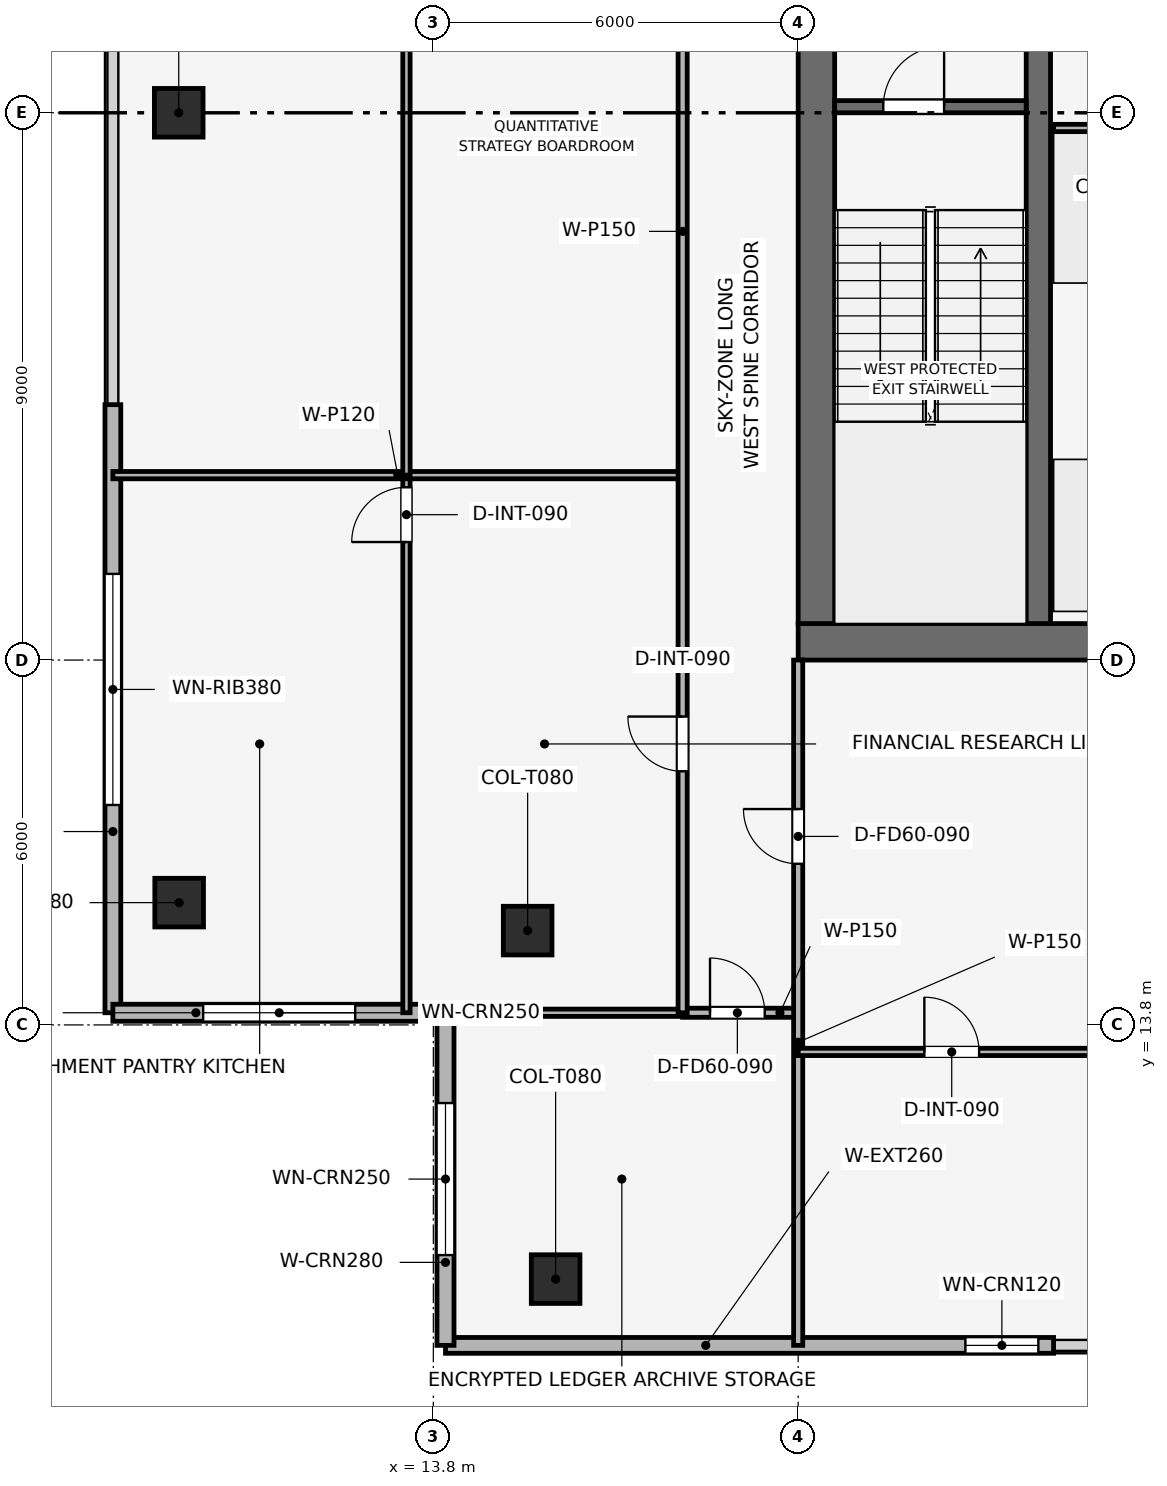
"""IFC4 building model, lengths in metres.
Left out: names, types, materials, properties, quantities, classifications, styles, units other than length and angle.
Written with IfcOpenShell. Run it as: python <this file> out.ifc"""

import sys

from ifc_helpers import new_model, si_unit, direction, frame, frame_2d, origin, origin_2d, place, context, subcontext, project, spatial, rectangle, extrude, element, fill, save


model = new_model("IFC4")
c1 = context("Model", 3, precision=1e-05, world=origin(), true_north=direction((0.0, 1.0)))
c2 = subcontext(c1, "Body", "Model", "MODEL_VIEW")
j1 = project(units=[si_unit("LENGTHUNIT", "METRE"), si_unit("PLANEANGLEUNIT", "RADIAN")], contexts=[c1])
p1 = place(None, origin())
s1 = spatial("IfcSite", under=j1, at=p1, CompositionType="ELEMENT")
p2 = place(p1, origin())
s2 = spatial("IfcBuilding", under=s1, at=p2, CompositionType="ELEMENT")
p3 = place(p2, frame((0.0, 0.0, 364.5)))
s3 = spatial("IfcBuildingStorey", under=s2, at=p3, CompositionType="ELEMENT", Elevation=364.5)
p4 = place(p3, frame((19.8, 20.1, 0.0), z_axis=(0.0, 0.0, 1.0), x_axis=(1.0, 0.0, 0.0)))
e1 = element("IfcWall", 1, at=p4, inside=s3, PredefinedType="SHEAR", context=c2, shape_type="SweptSolid", body=[
    extrude(rectangle(XDim=18.0, YDim=0.6, at=frame_2d((9.0, 0.0))), origin(), (0.0, 0.0, 1.0), 4.5),
])
p5 = place(p3, frame((20.1, 20.4, 0.0), z_axis=(0.0, 0.0, 1.0), x_axis=(0.0, 1.0, 0.0)))
e2 = element("IfcWall", 2, at=p5, inside=s3, PredefinedType="SHEAR", context=c2, shape_type="SweptSolid", body=[
    extrude(rectangle(XDim=16.8, YDim=0.6, at=frame_2d((8.4, 0.0))), origin(), (0.0, 0.0, 1.0), 4.5),
])
p6 = place(p5, frame((10.4, 0.0, 0.0)))
e3 = element("IfcOpeningElement", 3, at=p6, cuts=e2, PredefinedType="OPENING", context=c2, shape_type="SweptSolid", body=[
    extrude(rectangle(XDim=1.1, YDim=2.15, at=frame_2d((0.55, 1.075))), frame((0.0, 0.31, 0.0), z_axis=(0.0, -1.0, 0.0), x_axis=(1.0, 0.0, 0.0)), (0.0, 0.0, 1.0), 0.62),
])
p7 = place(p3, frame((23.75, 20.4, 0.0), z_axis=(0.0, 0.0, 1.0), x_axis=(0.0, 1.0, 0.0)))
e4 = element("IfcWall", 4, at=p7, inside=s3, PredefinedType="SHEAR", context=c2, shape_type="SweptSolid", body=[
    extrude(rectangle(XDim=16.8, YDim=0.4, at=frame_2d((8.4, 0.0))), origin(), (0.0, 0.0, 1.0), 4.5),
])
p8 = place(p3, frame((15.811, 9.62, 0.051), z_axis=(0.202047238794, 0.363749581663, 0.909320160964), x_axis=(-0.874193862425, 0.485577069989, 0.0)))
e5 = element("IfcColumn", 5, at=p8, inside=s3, PredefinedType="COLUMN", context=c2, shape_type="SweptSolid", body=[
    extrude(rectangle(XDim=0.8, YDim=0.8, at=origin_2d()), origin(), (0.0, 0.0, 1.0), 4.539),
])
p9 = place(p3, frame((9.613, 28.8, 0.033), z_axis=(0.371428235787, 0.0, 0.928461666231), x_axis=(0.0, 1.0, 0.0)))
e6 = element("IfcColumn", 6, at=p9, inside=s3, PredefinedType="COLUMN", context=c2, shape_type="SweptSolid", body=[
    extrude(rectangle(XDim=0.8, YDim=0.8, at=origin_2d()), origin(), (0.0, 0.0, 1.0), 4.483),
])
p10 = place(p3, frame((9.62, 15.811, 0.051), z_axis=(0.363749581663, 0.202047238794, 0.909320160964), x_axis=(-0.485577069989, 0.874193862425, 0.0)))
e7 = element("IfcColumn", 7, at=p10, inside=s3, PredefinedType="COLUMN", context=c2, shape_type="SweptSolid", body=[
    extrude(rectangle(XDim=0.8, YDim=0.8, at=origin_2d()), origin(), (0.0, 0.0, 1.0), 4.539),
])
p11 = place(p3, frame((15.351, 15.351, 0.005), z_axis=(0.21206137456, 0.21206137456, 0.953970621581), x_axis=(-0.707106781187, 0.707106781187, 0.0)))
e8 = element("IfcColumn", 8, at=p11, inside=s3, PredefinedType="COLUMN", context=c2, shape_type="SweptSolid", body=[
    extrude(rectangle(XDim=0.8, YDim=0.8, at=origin_2d()), origin(), (0.0, 0.0, 1.0), 4.395),
])
p12 = place(p3, frame((24.0, 8.53, 0.0), z_axis=(0.0, 0.0, 1.0), x_axis=(-1.0, 0.0, 0.0)))
e9 = element("IfcWall", 9, at=p12, inside=s3, PredefinedType="SOLIDWALL", context=c2, shape_type="SweptSolid", body=[
    extrude(rectangle(XDim=10.0, YDim=0.26, at=frame_2d((5.0, 0.0))), origin(), (0.0, 0.0, 1.0), 4.2),
])
p13 = place(p12, frame((0.25, 0.0, 0.9)))
e10 = element("IfcOpeningElement", 10, at=p13, cuts=e9, PredefinedType="OPENING", context=c2, shape_type="SweptSolid", body=[
    extrude(rectangle(XDim=1.2, YDim=2.1, at=frame_2d((0.6, 1.05))), frame((0.0, 0.14, 0.0), z_axis=(0.0, -1.0, 0.0), x_axis=(1.0, 0.0, 0.0)), (0.0, 0.0, 1.0), 0.28),
])
p14 = place(p3, frame((8.53, 14.0, 0.0), z_axis=(0.0, 0.0, 1.0), x_axis=(0.0, 1.0, 0.0)))
e11 = element("IfcWall", 11, at=p14, inside=s3, PredefinedType="SOLIDWALL", context=c2, shape_type="SweptSolid", body=[
    extrude(rectangle(XDim=10.0, YDim=0.26, at=frame_2d((5.0, 0.0))), origin(), (0.0, 0.0, 1.0), 4.2),
])
p15 = place(p14, frame((3.417, 0.0, 0.9)))
e12 = element("IfcOpeningElement", 12, at=p15, cuts=e11, PredefinedType="OPENING", context=c2, shape_type="SweptSolid", body=[
    extrude(rectangle(XDim=3.8, YDim=1.9, at=frame_2d((1.9, 0.95))), frame((0.0, 0.14, 0.0), z_axis=(0.0, -1.0, 0.0), x_axis=(1.0, 0.0, 0.0)), (0.0, 0.0, 1.0), 0.28),
])
p16 = place(p3, frame((14.0, 8.53, 0.0), z_axis=(0.0, 0.0, 1.0), x_axis=(0.0, 1.0, 0.0)))
e13 = element("IfcWall", 13, at=p16, inside=s3, PredefinedType="SOLIDWALL", context=c2, shape_type="SweptSolid", body=[
    extrude(rectangle(XDim=5.47, YDim=0.28, at=frame_2d((2.735, 0.0))), origin(), (0.0, 0.0, 1.0), 4.2),
])
p17 = place(p16, frame((1.485, 0.0, 0.9)))
e14 = element("IfcOpeningElement", 14, at=p17, cuts=e13, PredefinedType="OPENING", context=c2, shape_type="SweptSolid", body=[
    extrude(rectangle(XDim=2.5, YDim=1.9, at=frame_2d((1.25, 0.95))), frame((0.0, 0.15, 0.0), z_axis=(0.0, -1.0, 0.0), x_axis=(1.0, 0.0, 0.0)), (0.0, 0.0, 1.0), 0.3),
])
p18 = place(p3, frame((14.0, 14.0, 0.0), z_axis=(0.0, 0.0, 1.0), x_axis=(-1.0, 0.0, 0.0)))
e15 = element("IfcWall", 15, at=p18, inside=s3, PredefinedType="SOLIDWALL", context=c2, shape_type="SweptSolid", body=[
    extrude(rectangle(XDim=5.47, YDim=0.28, at=frame_2d((2.735, 0.0))), origin(), (0.0, 0.0, 1.0), 4.2),
])
p19 = place(p18, frame((1.485, 0.0, 0.9)))
e16 = element("IfcOpeningElement", 16, at=p19, cuts=e15, PredefinedType="OPENING", context=c2, shape_type="SweptSolid", body=[
    extrude(rectangle(XDim=2.5, YDim=1.9, at=frame_2d((1.25, 0.95))), frame((0.0, 0.15, 0.0), z_axis=(0.0, -1.0, 0.0), x_axis=(1.0, 0.0, 0.0)), (0.0, 0.0, 1.0), 0.3),
])
p20 = place(p3, frame((20.4, 28.9, 0.0), z_axis=(0.0, 0.0, 1.0), x_axis=(1.0, 0.0, 0.0)))
e17 = element("IfcWall", 17, at=p20, inside=s3, PredefinedType="SHEAR", context=c2, shape_type="SweptSolid", body=[
    extrude(rectangle(XDim=3.15, YDim=0.2, at=frame_2d((1.575, 0.0))), origin(), (0.0, 0.0, 1.0), 4.2),
])
p21 = place(p20, frame((0.8, 0.0, 0.0)))
e18 = element("IfcOpeningElement", 18, at=p21, cuts=e17, PredefinedType="OPENING", context=c2, shape_type="SweptSolid", body=[
    extrude(rectangle(XDim=1.0, YDim=2.1, at=frame_2d((0.5, 1.05))), frame((0.0, 0.11, 0.0), z_axis=(0.0, -1.0, 0.0), x_axis=(1.0, 0.0, 0.0)), (0.0, 0.0, 1.0), 0.22),
])
p22 = place(p3, frame((24.0, 28.55, 0.0), z_axis=(0.0, 0.0, 1.0), x_axis=(1.0, 0.0, 0.0)))
e19 = element("IfcWall", 19, at=p22, inside=s3, PredefinedType="PARTITIONING", context=c2, shape_type="SweptSolid", body=[
    extrude(rectangle(XDim=4.05, YDim=0.12, at=frame_2d((2.025, 0.0))), origin(), (0.0, 0.0, 1.0), 4.2),
])
p23 = place(p22, frame((1.575, 0.0, 0.0)))
e20 = element("IfcOpeningElement", 20, at=p23, cuts=e19, PredefinedType="OPENING", context=c2, shape_type="SweptSolid", body=[
    extrude(rectangle(XDim=0.9, YDim=2.1, at=frame_2d((0.45, 1.05))), frame((0.0, 0.07, 0.0), z_axis=(0.0, -1.0, 0.0), x_axis=(1.0, 0.0, 0.0)), (0.0, 0.0, 1.0), 0.14),
])
p24 = place(p3, frame((13.358, 14.0, 0.0), z_axis=(0.0, 0.0, 1.0), x_axis=(0.0, 1.0, 0.0)))
e21 = element("IfcWall", 21, at=p24, inside=s3, PredefinedType="PARTITIONING", context=c2, shape_type="SweptSolid", body=[
    extrude(rectangle(XDim=8.841, YDim=0.12, at=frame_2d((4.42, 0.0))), origin(), (0.0, 0.0, 1.0), 3.785),
])
p25 = place(p24, frame((7.741, 0.0, 0.0)))
e22 = element("IfcOpeningElement", 22, at=p25, cuts=e21, PredefinedType="OPENING", context=c2, shape_type="SweptSolid", body=[
    extrude(rectangle(XDim=0.9, YDim=2.1, at=frame_2d((0.45, 1.05))), frame((0.0, 0.07, 0.0), z_axis=(0.0, -1.0, 0.0), x_axis=(1.0, 0.0, 0.0)), (0.0, 0.0, 1.0), 0.14),
])
p26 = place(p3, frame((8.53, 22.841, 0.0), z_axis=(0.0, 0.0, 1.0), x_axis=(1.0, 0.0, 0.0)))
e23 = element("IfcWall", 23, at=p26, inside=s3, PredefinedType="PARTITIONING", context=c2, shape_type="SweptSolid", body=[
    extrude(rectangle(XDim=9.37, YDim=0.12, at=frame_2d((4.685, 0.0))), origin(), (0.0, 0.0, 1.0), 3.825),
])
p27 = place(p3, frame((13.358, 22.841, 0.0), z_axis=(0.0, 0.0, 1.0), x_axis=(0.0, 1.0, 0.0)))
e24 = element("IfcWall", 24, at=p27, inside=s3, PredefinedType="PARTITIONING", context=c2, shape_type="SweptSolid", body=[
    extrude(rectangle(XDim=16.859, YDim=0.12, at=frame_2d((8.429, 0.0))), origin(), (0.0, 0.0, 1.0), 3.285),
])
p28 = place(p27, frame((11.869, 0.0, 0.0)))
e25 = element("IfcOpeningElement", 25, at=p28, cuts=e24, PredefinedType="OPENING", context=c2, shape_type="SweptSolid", body=[
    extrude(rectangle(XDim=0.9, YDim=2.1, at=frame_2d((0.45, 1.05))), frame((0.0, 0.07, 0.0), z_axis=(0.0, -1.0, 0.0), x_axis=(1.0, 0.0, 0.0)), (0.0, 0.0, 1.0), 0.14),
])
p29 = place(p3, frame((14.0, 14.0, 0.0), z_axis=(0.0, 0.0, 1.0), x_axis=(1.0, 0.0, 0.0)))
e26 = element("IfcWall", 26, at=p29, inside=s3, PredefinedType="PARTITIONING", context=c2, shape_type="SweptSolid", body=[
    extrude(rectangle(XDim=3.9, YDim=0.12, at=frame_2d((1.95, 0.0))), origin(), (0.0, 0.0, 1.0), 3.885),
])
p30 = place(p3, frame((17.9, 14.0, 0.0), z_axis=(0.0, 0.0, 1.0), x_axis=(1.0, 0.0, 0.0)))
e27 = element("IfcWall", 27, at=p30, inside=s3, PredefinedType="PARTITIONING", context=c2, shape_type="SweptSolid", body=[
    extrude(rectangle(XDim=1.9, YDim=0.15, at=frame_2d((0.95, 0.0))), origin(), (0.0, 0.0, 1.0), 4.2),
])
p31 = place(p30, frame((0.45, 0.0, 0.0)))
e28 = element("IfcOpeningElement", 28, at=p31, cuts=e27, PredefinedType="OPENING", context=c2, shape_type="SweptSolid", body=[
    extrude(rectangle(XDim=0.9, YDim=2.1, at=frame_2d((0.45, 1.05))), frame((0.0, 0.085, 0.0), z_axis=(0.0, -1.0, 0.0), x_axis=(1.0, 0.0, 0.0)), (0.0, 0.0, 1.0), 0.17),
])
p32 = place(p3, frame((19.8, 8.53, 0.0), z_axis=(0.0, 0.0, 1.0), x_axis=(0.0, 1.0, 0.0)))
e29 = element("IfcWall", 29, at=p32, inside=s3, PredefinedType="PARTITIONING", context=c2, shape_type="SweptSolid", body=[
    extrude(rectangle(XDim=11.27, YDim=0.15, at=frame_2d((5.635, 0.0))), origin(), (0.0, 0.0, 1.0), 3.785),
])
p33 = place(p32, frame((7.92, 0.0, 0.0)))
e30 = element("IfcOpeningElement", 30, at=p33, cuts=e29, PredefinedType="OPENING", context=c2, shape_type="SweptSolid", body=[
    extrude(rectangle(XDim=0.9, YDim=2.1, at=frame_2d((0.45, 1.05))), frame((0.0, 0.085, 0.0), z_axis=(0.0, -1.0, 0.0), x_axis=(1.0, 0.0, 0.0)), (0.0, 0.0, 1.0), 0.17),
])
p34 = place(p3, frame((19.8, 13.356, 0.0), z_axis=(0.0, 0.0, 1.0), x_axis=(1.0, 0.0, 0.0)))
e31 = element("IfcWall", 31, at=p34, inside=s3, PredefinedType="PARTITIONING", context=c2, shape_type="SweptSolid", body=[
    extrude(rectangle(XDim=23.8, YDim=0.12, at=frame_2d((11.9, 0.0))), origin(), (0.0, 0.0, 1.0), 3.285),
])
p35 = place(p34, frame((2.075, 0.0, 0.0)))
e32 = element("IfcOpeningElement", 32, at=p35, cuts=e31, PredefinedType="OPENING", context=c2, shape_type="SweptSolid", body=[
    extrude(rectangle(XDim=0.9, YDim=2.1, at=frame_2d((0.45, 1.05))), frame((0.0, 0.07, 0.0), z_axis=(0.0, -1.0, 0.0), x_axis=(1.0, 0.0, 0.0)), (0.0, 0.0, 1.0), 0.14),
])
p36 = place(p3, frame((17.9, 14.0, 0.0), z_axis=(0.0, 0.0, 1.0), x_axis=(0.0, 1.0, 0.0)))
e33 = element("IfcWall", 33, at=p36, inside=s3, PredefinedType="PARTITIONING", context=c2, shape_type="SweptSolid", body=[
    extrude(rectangle(XDim=25.7, YDim=0.15, at=frame_2d((12.85, 0.0))), origin(), (0.0, 0.0, 1.0), 3.285),
])
p37 = place(p36, frame((3.971, 0.0, 0.0)))
e34 = element("IfcOpeningElement", 34, at=p37, cuts=e33, PredefinedType="OPENING", context=c2, shape_type="SweptSolid", body=[
    extrude(rectangle(XDim=0.9, YDim=2.1, at=frame_2d((0.45, 1.05))), frame((0.0, 0.085, 0.0), z_axis=(0.0, -1.0, 0.0), x_axis=(1.0, 0.0, 0.0)), (0.0, 0.0, 1.0), 0.17),
])
p38 = place(p36, frame((16.821, 0.0, 0.0)))
e35 = element("IfcOpeningElement", 35, at=p38, cuts=e33, PredefinedType="OPENING", context=c2, shape_type="SweptSolid", body=[
    extrude(rectangle(XDim=0.9, YDim=2.1, at=frame_2d((0.45, 1.05))), frame((0.0, 0.085, 0.0), z_axis=(0.0, -1.0, 0.0), x_axis=(1.0, 0.0, 0.0)), (0.0, 0.0, 1.0), 0.17),
])
p39 = place(p13, origin())
e36 = element("IfcWindow", 36, at=p39, inside=s3, PartitioningType="SINGLE_PANEL", PredefinedType="WINDOW", context=c2, shape_type="SweptSolid", body=[
    extrude(rectangle(XDim=1.2, YDim=2.1, at=frame_2d((0.6, 1.05))), frame((0.0, 0.03, 0.0), z_axis=(0.0, -1.0, 0.0), x_axis=(1.0, 0.0, 0.0)), (0.0, 0.0, 1.0), 0.06),
])
fill(e10, e36)
p40 = place(p15, origin())
e37 = element("IfcWindow", 37, at=p40, inside=s3, PartitioningType="SINGLE_PANEL", PredefinedType="WINDOW", context=c2, shape_type="SweptSolid", body=[
    extrude(rectangle(XDim=3.8, YDim=1.9, at=frame_2d((1.9, 0.95))), frame((0.0, 0.03, 0.0), z_axis=(0.0, -1.0, 0.0), x_axis=(1.0, 0.0, 0.0)), (0.0, 0.0, 1.0), 0.06),
])
fill(e12, e37)
p41 = place(p17, origin())
e38 = element("IfcWindow", 38, at=p41, inside=s3, PartitioningType="SINGLE_PANEL", PredefinedType="WINDOW", context=c2, shape_type="SweptSolid", body=[
    extrude(rectangle(XDim=2.5, YDim=1.9, at=frame_2d((1.25, 0.95))), frame((0.0, 0.03, 0.0), z_axis=(0.0, -1.0, 0.0), x_axis=(1.0, 0.0, 0.0)), (0.0, 0.0, 1.0), 0.06),
])
fill(e14, e38)
p42 = place(p19, origin())
e39 = element("IfcWindow", 39, at=p42, inside=s3, PartitioningType="SINGLE_PANEL", PredefinedType="WINDOW", context=c2, shape_type="SweptSolid", body=[
    extrude(rectangle(XDim=2.5, YDim=1.9, at=frame_2d((1.25, 0.95))), frame((0.0, 0.03, 0.0), z_axis=(0.0, -1.0, 0.0), x_axis=(1.0, 0.0, 0.0)), (0.0, 0.0, 1.0), 0.06),
])
fill(e16, e39)
p43 = place(p21, origin())
e40 = element("IfcDoor", 40, at=p43, inside=s3, OperationType="SINGLE_SWING_RIGHT", PredefinedType="DOOR", context=c2, shape_type="SweptSolid", body=[
    extrude(rectangle(XDim=1.0, YDim=2.1, at=frame_2d((0.5, 1.05))), frame((0.0, 0.025, 0.0), z_axis=(0.0, -1.0, 0.0), x_axis=(1.0, 0.0, 0.0)), (0.0, 0.0, 1.0), 0.05),
])
fill(e18, e40)
p44 = place(p25, origin())
e41 = element("IfcDoor", 41, at=p44, inside=s3, OperationType="SINGLE_SWING_LEFT", PredefinedType="DOOR", context=c2, shape_type="SweptSolid", body=[
    extrude(rectangle(XDim=0.9, YDim=2.1, at=frame_2d((0.45, 1.05))), frame((0.0, 0.025, 0.0), z_axis=(0.0, -1.0, 0.0), x_axis=(1.0, 0.0, 0.0)), (0.0, 0.0, 1.0), 0.05),
])
fill(e22, e41)
p45 = place(p31, origin())
e42 = element("IfcDoor", 42, at=p45, inside=s3, OperationType="SINGLE_SWING_LEFT", PredefinedType="DOOR", context=c2, shape_type="SweptSolid", body=[
    extrude(rectangle(XDim=0.9, YDim=2.1, at=frame_2d((0.45, 1.05))), frame((0.0, 0.025, 0.0), z_axis=(0.0, -1.0, 0.0), x_axis=(1.0, 0.0, 0.0)), (0.0, 0.0, 1.0), 0.05),
])
fill(e28, e42)
p46 = place(p33, origin())
e43 = element("IfcDoor", 43, at=p46, inside=s3, OperationType="SINGLE_SWING_RIGHT", PredefinedType="DOOR", context=c2, shape_type="SweptSolid", body=[
    extrude(rectangle(XDim=0.9, YDim=2.1, at=frame_2d((0.45, 1.05))), frame((0.0, 0.025, 0.0), z_axis=(0.0, -1.0, 0.0), x_axis=(1.0, 0.0, 0.0)), (0.0, 0.0, 1.0), 0.05),
])
fill(e30, e43)
p47 = place(p35, origin())
e44 = element("IfcDoor", 44, at=p47, inside=s3, OperationType="SINGLE_SWING_LEFT", PredefinedType="DOOR", context=c2, shape_type="SweptSolid", body=[
    extrude(rectangle(XDim=0.9, YDim=2.1, at=frame_2d((0.45, 1.05))), frame((0.0, 0.025, 0.0), z_axis=(0.0, -1.0, 0.0), x_axis=(1.0, 0.0, 0.0)), (0.0, 0.0, 1.0), 0.05),
])
fill(e32, e44)
p48 = place(p37, origin())
e45 = element("IfcDoor", 45, at=p48, inside=s3, OperationType="SINGLE_SWING_RIGHT", PredefinedType="DOOR", context=c2, shape_type="SweptSolid", body=[
    extrude(rectangle(XDim=0.9, YDim=2.1, at=frame_2d((0.45, 1.05))), frame((0.0, 0.025, 0.0), z_axis=(0.0, -1.0, 0.0), x_axis=(1.0, 0.0, 0.0)), (0.0, 0.0, 1.0), 0.05),
])
fill(e34, e45)
save(model, sys.argv[1])
